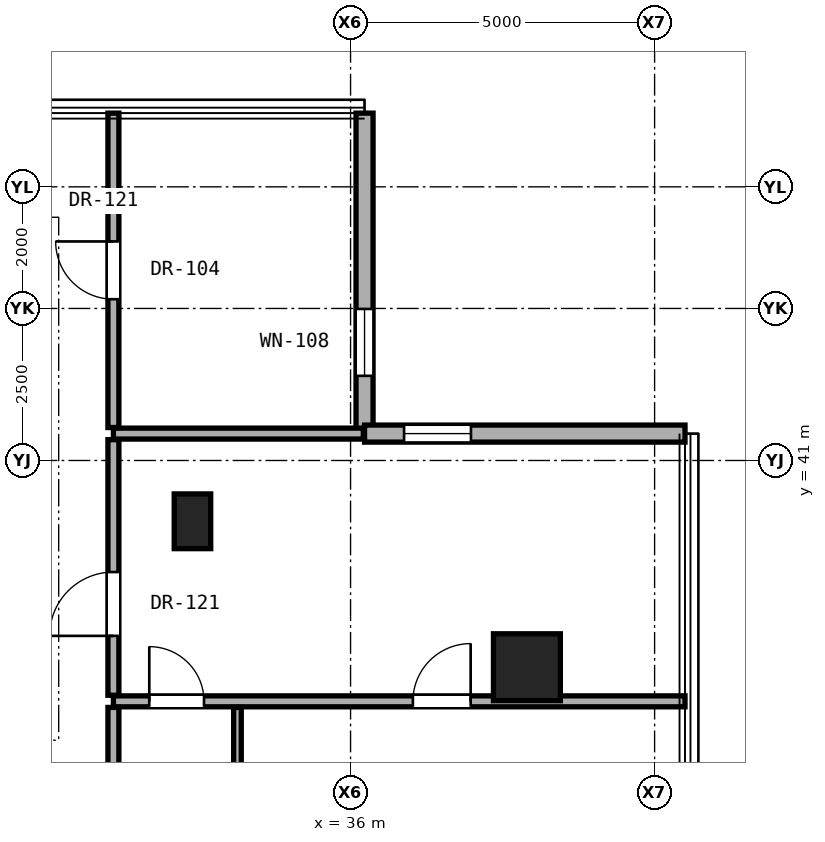
"""IFC4 building model, lengths in metres.
Left out: names, types, materials, properties, quantities, classifications, styles, units other than length and angle.
Written with IfcOpenShell. Run it as: python <this file> out.ifc"""

import sys

from ifc_helpers import new_model, si_unit, direction, frame, frame_2d, origin, origin_2d, place, context, subcontext, project, spatial, rectangle, hollow_rectangle, extrude, element, fill, save


model = new_model("IFC4")
c1 = context("Model", 3, precision=1e-05, world=origin(), true_north=direction((0.0, 1.0)))
c2 = subcontext(c1, "Body", "Model", "MODEL_VIEW")
j1 = project(units=[si_unit("LENGTHUNIT", "METRE"), si_unit("PLANEANGLEUNIT", "RADIAN")], contexts=[c1])
p1 = place(None, origin())
s1 = spatial("IfcSite", under=j1, at=p1, CompositionType="ELEMENT")
p2 = place(p1, origin())
s2 = spatial("IfcBuilding", under=s1, at=p2, CompositionType="ELEMENT")
p3 = place(p2, frame((0.0, 0.0, 131.3)))
s3 = spatial("IfcBuildingStorey", under=s2, at=p3, CompositionType="ELEMENT", Elevation=131.3)
p4 = place(p3, frame((38.9, 37.6, 0.0), z_axis=(0.0, 0.0, 1.0), x_axis=(1.0, 0.0, 0.0)))
e1 = element("IfcColumn", 1, at=p4, inside=s3, PredefinedType="COLUMN", context=c2, shape_type="SweptSolid", body=[
    extrude(hollow_rectangle(XDim=1.1, YDim=1.1, WallThickness=0.06, at=origin_2d()), origin(), (0.0, 0.0, 1.0), 3.3),
])
p5 = place(p3, frame((33.4, 40.0, 0.0), z_axis=(0.0, 0.0, 1.0), x_axis=(1.0, 0.0, 0.0)))
e2 = element("IfcColumn", 2, at=p5, inside=s3, PredefinedType="PILASTER", context=c2, shape_type="SweptSolid", body=[
    extrude(rectangle(XDim=0.6, YDim=0.9, at=origin_2d()), origin(), (0.0, 0.0, 1.0), 3.3),
])
p6 = place(p3, frame((36.23, 41.442, 0.0), z_axis=(0.0, 0.0, 1.0), x_axis=(0.0, 1.0, 0.0)))
e3 = element("IfcWall", 3, at=p6, inside=s3, PredefinedType="SOLIDWALL", context=c2, shape_type="SweptSolid", body=[
    extrude(rectangle(XDim=5.27, YDim=0.28, at=frame_2d((2.635, 0.0))), origin(), (0.0, 0.0, 1.0), 3.06),
])
p7 = place(p6, frame((0.95, 0.0, 0.85)))
e4 = element("IfcOpeningElement", 4, at=p7, cuts=e3, PredefinedType="OPENING", context=c2, shape_type="SweptSolid", body=[
    extrude(rectangle(XDim=1.1, YDim=2.0, at=frame_2d((0.55, 1.0))), frame((0.0, 0.15, 0.0), z_axis=(0.0, -1.0, 0.0), x_axis=(1.0, 0.0, 0.0)), (0.0, 0.0, 1.0), 0.3),
])
p8 = place(p3, frame((41.5, 41.442, 0.0), z_axis=(0.0, 0.0, 1.0), x_axis=(-1.0, 0.0, 0.0)))
e5 = element("IfcWall", 5, at=p8, inside=s3, PredefinedType="SOLIDWALL", context=c2, shape_type="SweptSolid", body=[
    extrude(rectangle(XDim=5.27, YDim=0.28, at=frame_2d((2.635, 0.0))), origin(), (0.0, 0.0, 1.0), 3.06),
])
p9 = place(p8, frame((3.52, 0.0, 0.85)))
e6 = element("IfcOpeningElement", 6, at=p9, cuts=e5, PredefinedType="OPENING", context=c2, shape_type="SweptSolid", body=[
    extrude(rectangle(XDim=1.1, YDim=2.0, at=frame_2d((0.55, 1.0))), frame((0.0, 0.15, 0.0), z_axis=(0.0, -1.0, 0.0), x_axis=(1.0, 0.0, 0.0)), (0.0, 0.0, 1.0), 0.3),
])
p10 = place(p3, frame((32.1, 37.039, 0.0), z_axis=(0.0, 0.0, 1.0), x_axis=(1.0, 0.0, 0.0)))
e7 = element("IfcWall", 7, at=p10, inside=s3, PredefinedType="PARTITIONING", context=c2, shape_type="SweptSolid", body=[
    extrude(rectangle(XDim=9.4, YDim=0.18, at=frame_2d((4.7, 0.0))), origin(), (0.0, 0.0, 1.0), 2.299),
])
p11 = place(p10, frame((4.925, 0.0, 0.0)))
e8 = element("IfcOpeningElement", 8, at=p11, cuts=e7, PredefinedType="OPENING", context=c2, shape_type="SweptSolid", body=[
    extrude(rectangle(XDim=0.95, YDim=2.15, at=frame_2d((0.475, 1.075))), frame((0.0, 0.1, 0.0), z_axis=(0.0, -1.0, 0.0), x_axis=(1.0, 0.0, 0.0)), (0.0, 0.0, 1.0), 0.2),
])
p12 = place(p10, frame((0.59, 0.0, 0.0)))
e9 = element("IfcOpeningElement", 9, at=p12, cuts=e7, PredefinedType="OPENING", context=c2, shape_type="SweptSolid", body=[
    extrude(rectangle(XDim=0.9, YDim=2.1, at=frame_2d((0.45, 1.05))), frame((0.0, 0.1, 0.0), z_axis=(0.0, -1.0, 0.0), x_axis=(1.0, 0.0, 0.0)), (0.0, 0.0, 1.0), 0.2),
])
p13 = place(p3, frame((32.1, 41.442, 0.0), z_axis=(0.0, 0.0, 1.0), x_axis=(1.0, 0.0, 0.0)))
e10 = element("IfcWall", 10, at=p13, inside=s3, PredefinedType="PARTITIONING", context=c2, shape_type="SweptSolid", body=[
    extrude(rectangle(XDim=4.11, YDim=0.18, at=frame_2d((2.055, 0.0))), origin(), (0.0, 0.0, 1.0), 3.08),
])
p14 = place(p3, frame((32.1, 34.392, 0.0), z_axis=(0.0, 0.0, 1.0), x_axis=(0.0, 1.0, 0.0)))
e11 = element("IfcWall", 11, at=p14, inside=s3, PredefinedType="PARTITIONING", context=c2, shape_type="SweptSolid", body=[
    extrude(rectangle(XDim=2.547, YDim=0.18, at=frame_2d((1.274, 0.0))), origin(), (0.0, 0.0, 1.0), 3.08),
])
p15 = place(p3, frame((32.1, 37.139, 0.0), z_axis=(0.0, 0.0, 1.0), x_axis=(0.0, 1.0, 0.0)))
e12 = element("IfcWall", 12, at=p15, inside=s3, PredefinedType="PARTITIONING", context=c2, shape_type="SweptSolid", body=[
    extrude(rectangle(XDim=4.203, YDim=0.18, at=frame_2d((2.102, 0.0))), origin(), (0.0, 0.0, 1.0), 2.456),
])
p16 = place(p15, frame((0.977, 0.0, 0.0)))
e13 = element("IfcOpeningElement", 13, at=p16, cuts=e12, PredefinedType="OPENING", context=c2, shape_type="SweptSolid", body=[
    extrude(rectangle(XDim=1.05, YDim=2.2, at=frame_2d((0.525, 1.1))), frame((0.0, 0.1, 0.0), z_axis=(0.0, -1.0, 0.0), x_axis=(1.0, 0.0, 0.0)), (0.0, 0.0, 1.0), 0.2),
])
p17 = place(p3, frame((32.1, 41.542, 0.0), z_axis=(0.0, 0.0, 1.0), x_axis=(0.0, 1.0, 0.0)))
e14 = element("IfcWall", 14, at=p17, inside=s3, PredefinedType="PARTITIONING", context=c2, shape_type="SweptSolid", body=[
    extrude(rectangle(XDim=5.17, YDim=0.18, at=frame_2d((2.585, 0.0))), origin(), (0.0, 0.0, 1.0), 3.08),
])
p18 = place(p17, frame((2.11, 0.0, 0.0)))
e15 = element("IfcOpeningElement", 15, at=p18, cuts=e14, PredefinedType="OPENING", context=c2, shape_type="SweptSolid", body=[
    extrude(rectangle(XDim=0.95, YDim=2.15, at=frame_2d((0.475, 1.075))), frame((0.0, 0.1, 0.0), z_axis=(0.0, -1.0, 0.0), x_axis=(1.0, 0.0, 0.0)), (0.0, 0.0, 1.0), 0.2),
])
p19 = place(p3, frame((34.14, 34.392, 0.0), z_axis=(0.0, 0.0, 1.0), x_axis=(0.0, 1.0, 0.0)))
e16 = element("IfcWall", 16, at=p19, inside=s3, PredefinedType="PARTITIONING", context=c2, shape_type="SweptSolid", body=[
    extrude(rectangle(XDim=2.547, YDim=0.125, at=frame_2d((1.274, 0.0))), origin(), (0.0, 0.0, 1.0), 3.08),
])
p20 = place(p7, origin())
e17 = element("IfcWindow", 17, at=p20, inside=s3, PartitioningType="SINGLE_PANEL", PredefinedType="WINDOW", context=c2, shape_type="SweptSolid", body=[
    extrude(rectangle(XDim=1.1, YDim=2.0, at=frame_2d((0.55, 1.0))), frame((0.0, 0.03, 0.0), z_axis=(0.0, -1.0, 0.0), x_axis=(1.0, 0.0, 0.0)), (0.0, 0.0, 1.0), 0.06),
])
fill(e4, e17)
p21 = place(p9, origin())
e18 = element("IfcWindow", 18, at=p21, inside=s3, PartitioningType="SINGLE_PANEL", PredefinedType="WINDOW", context=c2, shape_type="SweptSolid", body=[
    extrude(rectangle(XDim=1.1, YDim=2.0, at=frame_2d((0.55, 1.0))), frame((0.0, 0.03, 0.0), z_axis=(0.0, -1.0, 0.0), x_axis=(1.0, 0.0, 0.0)), (0.0, 0.0, 1.0), 0.06),
])
fill(e6, e18)
p22 = place(p16, origin())
e19 = element("IfcDoor", 19, at=p22, inside=s3, OperationType="SINGLE_SWING_LEFT", PredefinedType="DOOR", context=c2, shape_type="SweptSolid", body=[
    extrude(rectangle(XDim=1.05, YDim=2.2, at=frame_2d((0.525, 1.1))), frame((0.0, 0.025, 0.0), z_axis=(0.0, -1.0, 0.0), x_axis=(1.0, 0.0, 0.0)), (0.0, 0.0, 1.0), 0.05),
])
fill(e13, e19)
p23 = place(p11, origin())
e20 = element("IfcDoor", 20, at=p23, inside=s3, OperationType="SINGLE_SWING_RIGHT", PredefinedType="DOOR", context=c2, shape_type="SweptSolid", body=[
    extrude(rectangle(XDim=0.95, YDim=2.15, at=frame_2d((0.475, 1.075))), frame((0.0, 0.025, 0.0), z_axis=(0.0, -1.0, 0.0), x_axis=(1.0, 0.0, 0.0)), (0.0, 0.0, 1.0), 0.05),
])
fill(e8, e20)
p24 = place(p12, origin())
e21 = element("IfcDoor", 21, at=p24, inside=s3, OperationType="SINGLE_SWING_LEFT", PredefinedType="DOOR", context=c2, shape_type="SweptSolid", body=[
    extrude(rectangle(XDim=0.9, YDim=2.1, at=frame_2d((0.45, 1.05))), frame((0.0, 0.025, 0.0), z_axis=(0.0, -1.0, 0.0), x_axis=(1.0, 0.0, 0.0)), (0.0, 0.0, 1.0), 0.05),
])
fill(e9, e21)
p25 = place(p18, origin())
e22 = element("IfcDoor", 22, at=p25, inside=s3, OperationType="SINGLE_SWING_RIGHT", PredefinedType="DOOR", context=c2, shape_type="SweptSolid", body=[
    extrude(rectangle(XDim=0.95, YDim=2.15, at=frame_2d((0.475, 1.075))), frame((0.0, 0.025, 0.0), z_axis=(0.0, -1.0, 0.0), x_axis=(1.0, 0.0, 0.0)), (0.0, 0.0, 1.0), 0.05),
])
fill(e15, e22)
save(model, sys.argv[1])
